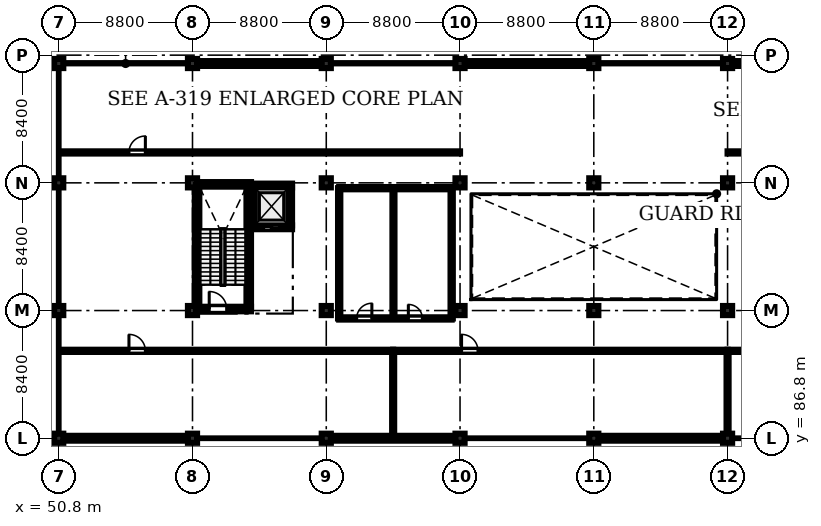
"""IFC4 building model, lengths in metres.
Left out: names, types, materials, properties, quantities, classifications, styles, units other than length and angle.
Written with IfcOpenShell. Run it as: python <this file> out.ifc"""

import sys

from ifc_helpers import new_model, si_unit, direction, frame, frame_2d, origin, origin_2d, place, context, subcontext, project, spatial, rectangle, extrude, element, fill, save


model = new_model("IFC4")
c1 = context("Model", 3, precision=1e-05, world=origin(), true_north=direction((0.0, 1.0)))
c2 = subcontext(c1, "Body", "Model", "MODEL_VIEW")
j1 = project(units=[si_unit("LENGTHUNIT", "METRE"), si_unit("PLANEANGLEUNIT", "RADIAN")], contexts=[c1])
p1 = place(None, origin())
s1 = spatial("IfcSite", under=j1, at=p1, CompositionType="ELEMENT")
p2 = place(p1, origin())
s2 = spatial("IfcBuilding", under=s1, at=p2, CompositionType="ELEMENT")
p3 = place(p2, frame((0.0, 0.0, 10.2)))
s3 = spatial("IfcBuildingStorey", under=s2, at=p3, CompositionType="ELEMENT", Elevation=10.2)
for number, where, z_axis, x_axis in (
    (1, (50.8, 86.8, 0.0), (0.0, 0.0, 1.0), (1.0, 0.0, 0.0)),
    (2, (50.8, 95.2, 0.0), (0.0, 0.0, 1.0), (1.0, 0.0, 0.0)),
    (3, (50.8, 103.6, 0.0), (0.0, 0.0, 1.0), (1.0, 0.0, 0.0)),
    (4, (50.8, 111.45, 0.0), (0.0, 0.0, 1.0), (1.0, 0.0, 0.0)),
    (5, (59.6, 86.8, 0.0), (0.0, 0.0, 1.0), (1.0, 0.0, 0.0)),
    (6, (59.6, 95.2, 0.0), (0.0, 0.0, 1.0), (1.0, 0.0, 0.0)),
    (7, (59.6, 103.6, 0.0), (0.0, 0.0, 1.0), (1.0, 0.0, 0.0)),
    (8, (59.6, 111.45, 0.0), (0.0, 0.0, 1.0), (1.0, 0.0, 0.0)),
    (9, (68.4, 86.8, 0.0), (0.0, 0.0, 1.0), (1.0, 0.0, 0.0)),
    (10, (68.4, 95.2, 0.0), (0.0, 0.0, 1.0), (1.0, 0.0, 0.0)),
    (11, (68.4, 103.6, 0.0), (0.0, 0.0, 1.0), (1.0, 0.0, 0.0)),
    (12, (68.4, 111.45, 0.0), (0.0, 0.0, 1.0), (1.0, 0.0, 0.0)),
    (13, (77.2, 86.8, 0.0), (0.0, 0.0, 1.0), (1.0, 0.0, 0.0)),
    (14, (77.2, 95.2, 0.0), (0.0, 0.0, 1.0), (1.0, 0.0, 0.0)),
    (15, (77.2, 103.6, 0.0), (0.0, 0.0, 1.0), (1.0, 0.0, 0.0)),
    (16, (77.2, 111.45, 0.0), (0.0, 0.0, 1.0), (1.0, 0.0, 0.0)),
    (17, (86.0, 86.8, 0.0), (0.0, 0.0, 1.0), (1.0, 0.0, 0.0)),
    (18, (86.0, 95.2, 0.0), (0.0, 0.0, 1.0), (1.0, 0.0, 0.0)),
    (19, (86.0, 103.6, 0.0), (0.0, 0.0, 1.0), (1.0, 0.0, 0.0)),
    (20, (86.0, 111.45, 0.0), (0.0, 0.0, 1.0), (1.0, 0.0, 0.0)),
    (21, (94.8, 86.8, 0.0), (0.0, 0.0, 1.0), (1.0, 0.0, 0.0)),
    (22, (94.8, 95.2, 0.0), (0.0, 0.0, 1.0), (1.0, 0.0, 0.0)),
    (23, (94.8, 103.6, 0.0), (0.0, 0.0, 1.0), (1.0, 0.0, 0.0)),
    (24, (94.8, 111.45, 0.0), (0.0, 0.0, 1.0), (1.0, 0.0, 0.0)),
):
    element("IfcColumn", number, at=place(p3, frame(where, z_axis=z_axis, x_axis=x_axis)), inside=s3, PredefinedType="COLUMN", context=c2, shape_type="SweptSolid", body=[
        extrude(rectangle(XDim=0.6, YDim=0.6, at=origin_2d()), origin(), (0.0, 0.0, 1.0), 4.26),
    ])
p4 = place(p3, frame((59.75, 95.3, 0.0), z_axis=(0.0, 0.0, 1.0), x_axis=(1.0, 0.0, 0.0)))
e25 = element("IfcWall", 25, at=p4, inside=s3, PredefinedType="SHEAR", context=c2, shape_type="SweptSolid", body=[
    extrude(rectangle(XDim=3.7, YDim=0.3, at=frame_2d((1.85, 0.0))), origin(), (0.0, 0.0, 1.0), 4.26),
])
p5 = place(p4, frame((0.95, 0.0, 0.0)))
e26 = element("IfcOpeningElement", 26, at=p5, cuts=e25, PredefinedType="OPENING", context=c2, shape_type="SweptSolid", body=[
    extrude(rectangle(XDim=1.15, YDim=2.15, at=frame_2d((0.575, 1.075))), frame((0.0, 0.16, 0.0), z_axis=(0.0, -1.0, 0.0), x_axis=(1.0, 0.0, 0.0)), (0.0, 0.0, 1.0), 0.32),
])
p6 = place(p3, frame((59.75, 103.5, 0.0), z_axis=(0.0, 0.0, 1.0), x_axis=(1.0, 0.0, 0.0)))
e27 = element("IfcWall", 27, at=p6, inside=s3, PredefinedType="SHEAR", context=c2, shape_type="SweptSolid", body=[
    extrude(rectangle(XDim=3.7, YDim=0.3, at=frame_2d((1.85, 0.0))), origin(), (0.0, 0.0, 1.0), 4.26),
])
for number, where, z_axis, x_axis in (
    (28, (59.9, 95.45, 0.0), (0.0, 0.0, 1.0), (0.0, 1.0, 0.0)),
    (29, (63.3, 95.45, 0.0), (0.0, 0.0, 1.0), (0.0, 1.0, 0.0)),
):
    element("IfcWall", number, at=place(p3, frame(where, z_axis=z_axis, x_axis=x_axis)), inside=s3, PredefinedType="SHEAR", context=c2, shape_type="SweptSolid", body=[
        extrude(rectangle(XDim=7.9, YDim=0.3, at=frame_2d((3.95, 0.0))), origin(), (0.0, 0.0, 1.0), 4.26),
    ])
p7 = place(p3, frame((63.45, 100.675, 0.0), z_axis=(0.0, 0.0, 1.0), x_axis=(1.0, 0.0, 0.0)))
e30 = element("IfcWall", 30, at=p7, inside=s3, PredefinedType="SHEAR", context=c2, shape_type="SweptSolid", body=[
    extrude(rectangle(XDim=2.7, YDim=0.25, at=frame_2d((1.35, 0.0))), origin(), (0.0, 0.0, 1.0), 4.26),
])
p8 = place(p7, frame((0.83, 0.0, 0.0)))
e31 = element("IfcOpeningElement", 31, at=p8, cuts=e30, PredefinedType="OPENING", context=c2, shape_type="SweptSolid", body=[
    extrude(rectangle(XDim=1.04, YDim=2.15, at=frame_2d((0.52, 1.075))), frame((0.0, 0.135, 0.0), z_axis=(0.0, -1.0, 0.0), x_axis=(1.0, 0.0, 0.0)), (0.0, 0.0, 1.0), 0.27),
])
p9 = place(p3, frame((63.45, 103.425, 0.0), z_axis=(0.0, 0.0, 1.0), x_axis=(1.0, 0.0, 0.0)))
e32 = element("IfcWall", 32, at=p9, inside=s3, PredefinedType="SHEAR", context=c2, shape_type="SweptSolid", body=[
    extrude(rectangle(XDim=2.7, YDim=0.25, at=frame_2d((1.35, 0.0))), origin(), (0.0, 0.0, 1.0), 4.26),
])
for number, where, z_axis, x_axis in (
    (33, (63.575, 100.8, 0.0), (0.0, 0.0, 1.0), (0.0, 1.0, 0.0)),
    (34, (66.025, 100.8, 0.0), (0.0, 0.0, 1.0), (0.0, 1.0, 0.0)),
):
    element("IfcWall", number, at=place(p3, frame(where, z_axis=z_axis, x_axis=x_axis)), inside=s3, PredefinedType="SHEAR", context=c2, shape_type="SweptSolid", body=[
        extrude(rectangle(XDim=2.5, YDim=0.25, at=frame_2d((1.25, 0.0))), origin(), (0.0, 0.0, 1.0), 4.26),
    ])
p10 = place(p3, frame((59.3, 86.8, 0.0), z_axis=(0.0, 0.0, 1.0), x_axis=(-1.0, 0.0, 0.0)))
e35 = element("IfcWall", 35, at=p10, inside=s3, PredefinedType="STANDARD", context=c2, shape_type="SweptSolid", body=[
    extrude(rectangle(XDim=8.2, YDim=0.32, at=frame_2d((4.1, 0.0))), origin(), (0.0, 0.0, 1.0), 3.61),
])
p11 = place(p10, frame((2.8, 0.0, 0.95)))
e36 = element("IfcOpeningElement", 36, at=p11, cuts=e35, PredefinedType="OPENING", context=c2, shape_type="SweptSolid", body=[
    extrude(rectangle(XDim=1.95, YDim=2.15, at=frame_2d((0.975, 1.075))), frame((0.0, 0.17, 0.0), z_axis=(0.0, -1.0, 0.0), x_axis=(1.0, 0.0, 0.0)), (0.0, 0.0, 1.0), 0.34),
])
p12 = place(p3, frame((59.9, 111.45, 0.0), z_axis=(0.0, 0.0, 1.0), x_axis=(1.0, 0.0, 0.0)))
e37 = element("IfcWall", 37, at=p12, inside=s3, PredefinedType="STANDARD", context=c2, shape_type="SweptSolid", body=[
    extrude(rectangle(XDim=8.2, YDim=0.32, at=frame_2d((4.1, 0.0))), origin(), (0.0, 0.0, 1.0), 3.51),
])
p13 = place(p12, frame((1.1, 0.0, 0.9)))
e38 = element("IfcOpeningElement", 38, at=p13, cuts=e37, PredefinedType="OPENING", context=c2, shape_type="SweptSolid", body=[
    extrude(rectangle(XDim=2.4, YDim=2.2, at=frame_2d((1.2, 1.1))), frame((0.0, 0.17, 0.0), z_axis=(0.0, -1.0, 0.0), x_axis=(1.0, 0.0, 0.0)), (0.0, 0.0, 1.0), 0.34),
])
p14 = place(p12, frame((4.7, 0.0, 0.9)))
e39 = element("IfcOpeningElement", 39, at=p14, cuts=e37, PredefinedType="OPENING", context=c2, shape_type="SweptSolid", body=[
    extrude(rectangle(XDim=2.4, YDim=2.2, at=frame_2d((1.2, 1.1))), frame((0.0, 0.17, 0.0), z_axis=(0.0, -1.0, 0.0), x_axis=(1.0, 0.0, 0.0)), (0.0, 0.0, 1.0), 0.34),
])
p15 = place(p3, frame((76.9, 86.8, 0.0), z_axis=(0.0, 0.0, 1.0), x_axis=(-1.0, 0.0, 0.0)))
e40 = element("IfcWall", 40, at=p15, inside=s3, PredefinedType="STANDARD", context=c2, shape_type="SweptSolid", body=[
    extrude(rectangle(XDim=8.2, YDim=0.32, at=frame_2d((4.1, 0.0))), origin(), (0.0, 0.0, 1.0), 3.61),
])
p16 = place(p15, frame((1.2, 0.0, 0.95)))
e41 = element("IfcOpeningElement", 41, at=p16, cuts=e40, PredefinedType="OPENING", context=c2, shape_type="SweptSolid", body=[
    extrude(rectangle(XDim=1.95, YDim=2.15, at=frame_2d((0.975, 1.075))), frame((0.0, 0.17, 0.0), z_axis=(0.0, -1.0, 0.0), x_axis=(1.0, 0.0, 0.0)), (0.0, 0.0, 1.0), 0.34),
])
p17 = place(p3, frame((77.5, 111.45, 0.0), z_axis=(0.0, 0.0, 1.0), x_axis=(1.0, 0.0, 0.0)))
e42 = element("IfcWall", 42, at=p17, inside=s3, PredefinedType="STANDARD", context=c2, shape_type="SweptSolid", body=[
    extrude(rectangle(XDim=8.2, YDim=0.32, at=frame_2d((4.1, 0.0))), origin(), (0.0, 0.0, 1.0), 3.51),
])
p18 = place(p17, frame((1.1, 0.0, 0.9)))
e43 = element("IfcOpeningElement", 43, at=p18, cuts=e42, PredefinedType="OPENING", context=c2, shape_type="SweptSolid", body=[
    extrude(rectangle(XDim=2.4, YDim=2.2, at=frame_2d((1.2, 1.1))), frame((0.0, 0.17, 0.0), z_axis=(0.0, -1.0, 0.0), x_axis=(1.0, 0.0, 0.0)), (0.0, 0.0, 1.0), 0.34),
])
p19 = place(p17, frame((4.7, 0.0, 0.9)))
e44 = element("IfcOpeningElement", 44, at=p19, cuts=e42, PredefinedType="OPENING", context=c2, shape_type="SweptSolid", body=[
    extrude(rectangle(XDim=2.4, YDim=2.2, at=frame_2d((1.2, 1.1))), frame((0.0, 0.17, 0.0), z_axis=(0.0, -1.0, 0.0), x_axis=(1.0, 0.0, 0.0)), (0.0, 0.0, 1.0), 0.34),
])
p20 = place(p3, frame((94.5, 86.8, 0.0), z_axis=(0.0, 0.0, 1.0), x_axis=(-1.0, 0.0, 0.0)))
e45 = element("IfcWall", 45, at=p20, inside=s3, PredefinedType="STANDARD", context=c2, shape_type="SweptSolid", body=[
    extrude(rectangle(XDim=8.2, YDim=0.32, at=frame_2d((4.1, 0.0))), origin(), (0.0, 0.0, 1.0), 3.61),
])
p21 = place(p20, frame((2.8, 0.0, 0.95)))
e46 = element("IfcOpeningElement", 46, at=p21, cuts=e45, PredefinedType="OPENING", context=c2, shape_type="SweptSolid", body=[
    extrude(rectangle(XDim=1.95, YDim=2.15, at=frame_2d((0.975, 1.075))), frame((0.0, 0.17, 0.0), z_axis=(0.0, -1.0, 0.0), x_axis=(1.0, 0.0, 0.0)), (0.0, 0.0, 1.0), 0.34),
])
p22 = place(p3, frame((95.1, 111.45, 0.0), z_axis=(0.0, 0.0, 1.0), x_axis=(1.0, 0.0, 0.0)))
e47 = element("IfcWall", 47, at=p22, inside=s3, PredefinedType="STANDARD", context=c2, shape_type="SweptSolid", body=[
    extrude(rectangle(XDim=8.2, YDim=0.32, at=frame_2d((4.1, 0.0))), origin(), (0.0, 0.0, 1.0), 3.51),
])
p23 = place(p22, frame((1.1, 0.0, 0.9)))
e48 = element("IfcOpeningElement", 48, at=p23, cuts=e47, PredefinedType="OPENING", context=c2, shape_type="SweptSolid", body=[
    extrude(rectangle(XDim=2.4, YDim=2.2, at=frame_2d((1.2, 1.1))), frame((0.0, 0.17, 0.0), z_axis=(0.0, -1.0, 0.0), x_axis=(1.0, 0.0, 0.0)), (0.0, 0.0, 1.0), 0.34),
])
p24 = place(p22, frame((4.7, 0.0, 0.9)))
e49 = element("IfcOpeningElement", 49, at=p24, cuts=e47, PredefinedType="OPENING", context=c2, shape_type="SweptSolid", body=[
    extrude(rectangle(XDim=2.4, YDim=2.2, at=frame_2d((1.2, 1.1))), frame((0.0, 0.17, 0.0), z_axis=(0.0, -1.0, 0.0), x_axis=(1.0, 0.0, 0.0)), (0.0, 0.0, 1.0), 0.34),
])
p25 = place(p3, frame((69.25, 94.68, 0.0), z_axis=(0.0, 0.0, 1.0), x_axis=(1.0, 0.0, 0.0)))
e50 = element("IfcWall", 50, at=p25, inside=s3, PredefinedType="PARTITIONING", context=c2, shape_type="SweptSolid", body=[
    extrude(rectangle(XDim=7.4, YDim=0.15, at=frame_2d((3.7, 0.0))), origin(), (0.0, 0.0, 1.0), 4.26),
])
p26 = place(p25, frame((1.15, 0.0, 0.0)))
e51 = element("IfcOpeningElement", 51, at=p26, cuts=e50, PredefinedType="OPENING", context=c2, shape_type="SweptSolid", body=[
    extrude(rectangle(XDim=1.0, YDim=2.12, at=frame_2d((0.5, 1.06))), frame((0.0, 0.085, 0.0), z_axis=(0.0, -1.0, 0.0), x_axis=(1.0, 0.0, 0.0)), (0.0, 0.0, 1.0), 0.17),
])
p27 = place(p25, frame((4.55, 0.0, 0.0)))
e52 = element("IfcOpeningElement", 52, at=p27, cuts=e50, PredefinedType="OPENING", context=c2, shape_type="SweptSolid", body=[
    extrude(rectangle(XDim=0.92, YDim=2.1, at=frame_2d((0.46, 1.05))), frame((0.0, 0.085, 0.0), z_axis=(0.0, -1.0, 0.0), x_axis=(1.0, 0.0, 0.0)), (0.0, 0.0, 1.0), 0.17),
])
p28 = place(p3, frame((69.25, 94.68, 0.0), z_axis=(0.0, 0.0, 1.0), x_axis=(0.0, 1.0, 0.0)))
e53 = element("IfcWall", 53, at=p28, inside=s3, PredefinedType="PARTITIONING", context=c2, shape_type="SweptSolid", body=[
    extrude(rectangle(XDim=8.57, YDim=0.15, at=frame_2d((4.285, 0.0))), origin(), (0.0, 0.0, 1.0), 4.26),
])
p29 = place(p3, frame((72.82, 94.68, 0.0), z_axis=(0.0, 0.0, 1.0), x_axis=(0.0, 1.0, 0.0)))
e54 = element("IfcWall", 54, at=p29, inside=s3, PredefinedType="PARTITIONING", context=c2, shape_type="SweptSolid", body=[
    extrude(rectangle(XDim=8.57, YDim=0.135, at=frame_2d((4.285, 0.0))), origin(), (0.0, 0.0, 1.0), 3.76),
])
p30 = place(p3, frame((69.25, 103.25, 0.0), z_axis=(0.0, 0.0, 1.0), x_axis=(1.0, 0.0, 0.0)))
e55 = element("IfcWall", 55, at=p30, inside=s3, PredefinedType="PARTITIONING", context=c2, shape_type="SweptSolid", body=[
    extrude(rectangle(XDim=7.4, YDim=0.15, at=frame_2d((3.7, 0.0))), origin(), (0.0, 0.0, 1.0), 4.26),
])
p31 = place(p3, frame((76.65, 94.68, 0.0), z_axis=(0.0, 0.0, 1.0), x_axis=(0.0, 1.0, 0.0)))
e56 = element("IfcWall", 56, at=p31, inside=s3, PredefinedType="PARTITIONING", context=c2, shape_type="SweptSolid", body=[
    extrude(rectangle(XDim=8.57, YDim=0.15, at=frame_2d((4.285, 0.0))), origin(), (0.0, 0.0, 1.0), 4.26),
])
p32 = place(p3, frame((50.92, 92.55, 0.0), z_axis=(0.0, 0.0, 1.0), x_axis=(1.0, 0.0, 0.0)))
e57 = element("IfcWall", 57, at=p32, inside=s3, PredefinedType="PARTITIONING", context=c2, shape_type="SweptSolid", body=[
    extrude(rectangle(XDim=21.88, YDim=0.145, at=frame_2d((10.94, 0.0))), origin(), (0.0, 0.0, 1.0), 4.26),
])
p33 = place(p32, frame((4.5, 0.0, 0.0)))
e58 = element("IfcOpeningElement", 58, at=p33, cuts=e57, PredefinedType="OPENING", context=c2, shape_type="SweptSolid", body=[
    extrude(rectangle(XDim=1.08, YDim=2.15, at=frame_2d((0.54, 1.075))), frame((0.0, 0.083, 0.0), z_axis=(0.0, -1.0, 0.0), x_axis=(1.0, 0.0, 0.0)), (0.0, 0.0, 1.0), 0.165),
])
p34 = place(p3, frame((72.8, 92.55, 0.0), z_axis=(0.0, 0.0, 1.0), x_axis=(1.0, 0.0, 0.0)))
e59 = element("IfcWall", 59, at=p34, inside=s3, PredefinedType="PARTITIONING", context=c2, shape_type="SweptSolid", body=[
    extrude(rectangle(XDim=22.0, YDim=0.145, at=frame_2d((11.0, 0.0))), origin(), (0.0, 0.0, 1.0), 4.26),
])
p35 = place(p34, frame((4.5, 0.0, 0.0)))
e60 = element("IfcOpeningElement", 60, at=p35, cuts=e59, PredefinedType="OPENING", context=c2, shape_type="SweptSolid", body=[
    extrude(rectangle(XDim=1.08, YDim=2.15, at=frame_2d((0.54, 1.075))), frame((0.0, 0.083, 0.0), z_axis=(0.0, -1.0, 0.0), x_axis=(1.0, 0.0, 0.0)), (0.0, 0.0, 1.0), 0.165),
])
p36 = place(p3, frame((72.8, 86.95, 0.0), z_axis=(0.0, 0.0, 1.0), x_axis=(0.0, 1.0, 0.0)))
e61 = element("IfcWall", 61, at=p36, inside=s3, PredefinedType="PARTITIONING", context=c2, shape_type="SweptSolid", body=[
    extrude(rectangle(XDim=5.6, YDim=0.135, at=frame_2d((2.8, 0.0))), origin(), (0.0, 0.0, 1.0), 3.76),
])
p37 = place(p3, frame((94.8, 92.55, 0.0), z_axis=(0.0, 0.0, 1.0), x_axis=(1.0, 0.0, 0.0)))
e62 = element("IfcWall", 62, at=p37, inside=s3, PredefinedType="PARTITIONING", context=c2, shape_type="SweptSolid", body=[
    extrude(rectangle(XDim=26.22, YDim=0.145, at=frame_2d((13.11, 0.0))), origin(), (0.0, 0.0, 1.0), 4.26),
])
p38 = place(p37, frame((4.5, 0.0, 0.0)))
e63 = element("IfcOpeningElement", 63, at=p38, cuts=e62, PredefinedType="OPENING", context=c2, shape_type="SweptSolid", body=[
    extrude(rectangle(XDim=1.7, YDim=2.2, at=frame_2d((0.85, 1.1))), frame((0.0, 0.083, 0.0), z_axis=(0.0, -1.0, 0.0), x_axis=(1.0, 0.0, 0.0)), (0.0, 0.0, 1.0), 0.165),
])
p39 = place(p3, frame((94.8, 86.95, 0.0), z_axis=(0.0, 0.0, 1.0), x_axis=(0.0, 1.0, 0.0)))
e64 = element("IfcWall", 64, at=p39, inside=s3, PredefinedType="PARTITIONING", context=c2, shape_type="SweptSolid", body=[
    extrude(rectangle(XDim=5.6, YDim=0.135, at=frame_2d((2.8, 0.0))), origin(), (0.0, 0.0, 1.0), 3.61),
])
p40 = place(p3, frame((50.92, 105.6, 0.0), z_axis=(0.0, 0.0, 1.0), x_axis=(1.0, 0.0, 0.0)))
e65 = element("IfcWall", 65, at=p40, inside=s3, PredefinedType="PARTITIONING", context=c2, shape_type="SweptSolid", body=[
    extrude(rectangle(XDim=26.28, YDim=0.145, at=frame_2d((13.14, 0.0))), origin(), (0.0, 0.0, 1.0), 4.26),
])
p41 = place(p40, frame((4.5, 0.0, 0.0)))
e66 = element("IfcOpeningElement", 66, at=p41, cuts=e65, PredefinedType="OPENING", context=c2, shape_type="SweptSolid", body=[
    extrude(rectangle(XDim=1.08, YDim=2.15, at=frame_2d((0.54, 1.075))), frame((0.0, 0.083, 0.0), z_axis=(0.0, -1.0, 0.0), x_axis=(1.0, 0.0, 0.0)), (0.0, 0.0, 1.0), 0.165),
])
p42 = place(p3, frame((94.8, 105.6, 0.0), z_axis=(0.0, 0.0, 1.0), x_axis=(1.0, 0.0, 0.0)))
e67 = element("IfcWall", 67, at=p42, inside=s3, PredefinedType="PARTITIONING", context=c2, shape_type="SweptSolid", body=[
    extrude(rectangle(XDim=26.22, YDim=0.145, at=frame_2d((13.11, 0.0))), origin(), (0.0, 0.0, 1.0), 4.26),
])
p43 = place(p42, frame((4.5, 0.0, 0.0)))
e68 = element("IfcOpeningElement", 68, at=p43, cuts=e67, PredefinedType="OPENING", context=c2, shape_type="SweptSolid", body=[
    extrude(rectangle(XDim=1.02, YDim=2.15, at=frame_2d((0.51, 1.075))), frame((0.0, 0.083, 0.0), z_axis=(0.0, -1.0, 0.0), x_axis=(1.0, 0.0, 0.0)), (0.0, 0.0, 1.0), 0.165),
])
p44 = place(p11, origin())
e69 = element("IfcWindow", 69, at=p44, inside=s3, PartitioningType="DOUBLE_PANEL_VERTICAL", PredefinedType="WINDOW", context=c2, shape_type="SweptSolid", body=[
    extrude(rectangle(XDim=1.95, YDim=2.15, at=frame_2d((0.975, 1.075))), frame((0.0, 0.03, 0.0), z_axis=(0.0, -1.0, 0.0), x_axis=(1.0, 0.0, 0.0)), (0.0, 0.0, 1.0), 0.06),
])
fill(e36, e69)
p45 = place(p13, origin())
e70 = element("IfcWindow", 70, at=p45, inside=s3, PartitioningType="TRIPLE_PANEL_VERTICAL", PredefinedType="WINDOW", context=c2, shape_type="SweptSolid", body=[
    extrude(rectangle(XDim=2.4, YDim=2.2, at=frame_2d((1.2, 1.1))), frame((0.0, 0.03, 0.0), z_axis=(0.0, -1.0, 0.0), x_axis=(1.0, 0.0, 0.0)), (0.0, 0.0, 1.0), 0.06),
])
fill(e38, e70)
p46 = place(p14, origin())
e71 = element("IfcWindow", 71, at=p46, inside=s3, PartitioningType="TRIPLE_PANEL_VERTICAL", PredefinedType="WINDOW", context=c2, shape_type="SweptSolid", body=[
    extrude(rectangle(XDim=2.4, YDim=2.2, at=frame_2d((1.2, 1.1))), frame((0.0, 0.03, 0.0), z_axis=(0.0, -1.0, 0.0), x_axis=(1.0, 0.0, 0.0)), (0.0, 0.0, 1.0), 0.06),
])
fill(e39, e71)
p47 = place(p16, origin())
e72 = element("IfcWindow", 72, at=p47, inside=s3, PartitioningType="DOUBLE_PANEL_VERTICAL", PredefinedType="WINDOW", context=c2, shape_type="SweptSolid", body=[
    extrude(rectangle(XDim=1.95, YDim=2.15, at=frame_2d((0.975, 1.075))), frame((0.0, 0.03, 0.0), z_axis=(0.0, -1.0, 0.0), x_axis=(1.0, 0.0, 0.0)), (0.0, 0.0, 1.0), 0.06),
])
fill(e41, e72)
p48 = place(p18, origin())
e73 = element("IfcWindow", 73, at=p48, inside=s3, PartitioningType="TRIPLE_PANEL_VERTICAL", PredefinedType="WINDOW", context=c2, shape_type="SweptSolid", body=[
    extrude(rectangle(XDim=2.4, YDim=2.2, at=frame_2d((1.2, 1.1))), frame((0.0, 0.03, 0.0), z_axis=(0.0, -1.0, 0.0), x_axis=(1.0, 0.0, 0.0)), (0.0, 0.0, 1.0), 0.06),
])
fill(e43, e73)
p49 = place(p19, origin())
e74 = element("IfcWindow", 74, at=p49, inside=s3, PartitioningType="TRIPLE_PANEL_VERTICAL", PredefinedType="WINDOW", context=c2, shape_type="SweptSolid", body=[
    extrude(rectangle(XDim=2.4, YDim=2.2, at=frame_2d((1.2, 1.1))), frame((0.0, 0.03, 0.0), z_axis=(0.0, -1.0, 0.0), x_axis=(1.0, 0.0, 0.0)), (0.0, 0.0, 1.0), 0.06),
])
fill(e44, e74)
p50 = place(p21, origin())
e75 = element("IfcWindow", 75, at=p50, inside=s3, PartitioningType="DOUBLE_PANEL_VERTICAL", PredefinedType="WINDOW", context=c2, shape_type="SweptSolid", body=[
    extrude(rectangle(XDim=1.95, YDim=2.15, at=frame_2d((0.975, 1.075))), frame((0.0, 0.03, 0.0), z_axis=(0.0, -1.0, 0.0), x_axis=(1.0, 0.0, 0.0)), (0.0, 0.0, 1.0), 0.06),
])
fill(e46, e75)
p51 = place(p26, origin())
e76 = element("IfcDoor", 76, at=p51, inside=s3, OperationType="SINGLE_SWING_RIGHT", PredefinedType="DOOR", context=c2, shape_type="SweptSolid", body=[
    extrude(rectangle(XDim=1.0, YDim=2.12, at=frame_2d((0.5, 1.06))), frame((0.0, 0.025, 0.0), z_axis=(0.0, -1.0, 0.0), x_axis=(1.0, 0.0, 0.0)), (0.0, 0.0, 1.0), 0.05),
])
fill(e51, e76)
p52 = place(p27, origin())
e77 = element("IfcDoor", 77, at=p52, inside=s3, OperationType="SINGLE_SWING_LEFT", PredefinedType="DOOR", context=c2, shape_type="SweptSolid", body=[
    extrude(rectangle(XDim=0.92, YDim=2.1, at=frame_2d((0.46, 1.05))), frame((0.0, 0.025, 0.0), z_axis=(0.0, -1.0, 0.0), x_axis=(1.0, 0.0, 0.0)), (0.0, 0.0, 1.0), 0.05),
])
fill(e52, e77)
p53 = place(p33, origin())
e78 = element("IfcDoor", 78, at=p53, inside=s3, OperationType="SINGLE_SWING_LEFT", PredefinedType="DOOR", context=c2, shape_type="SweptSolid", body=[
    extrude(rectangle(XDim=1.08, YDim=2.15, at=frame_2d((0.54, 1.075))), frame((0.0, 0.025, 0.0), z_axis=(0.0, -1.0, 0.0), x_axis=(1.0, 0.0, 0.0)), (0.0, 0.0, 1.0), 0.05),
])
fill(e58, e78)
p54 = place(p35, origin())
e79 = element("IfcDoor", 79, at=p54, inside=s3, OperationType="SINGLE_SWING_LEFT", PredefinedType="DOOR", context=c2, shape_type="SweptSolid", body=[
    extrude(rectangle(XDim=1.08, YDim=2.15, at=frame_2d((0.54, 1.075))), frame((0.0, 0.025, 0.0), z_axis=(0.0, -1.0, 0.0), x_axis=(1.0, 0.0, 0.0)), (0.0, 0.0, 1.0), 0.05),
])
fill(e60, e79)
p55 = place(p41, origin())
e80 = element("IfcDoor", 80, at=p55, inside=s3, OperationType="SINGLE_SWING_RIGHT", PredefinedType="DOOR", context=c2, shape_type="SweptSolid", body=[
    extrude(rectangle(XDim=1.08, YDim=2.15, at=frame_2d((0.54, 1.075))), frame((0.0, 0.025, 0.0), z_axis=(0.0, -1.0, 0.0), x_axis=(1.0, 0.0, 0.0)), (0.0, 0.0, 1.0), 0.05),
])
fill(e66, e80)
p56 = place(p5, origin())
e81 = element("IfcDoor", 81, at=p56, inside=s3, OperationType="SINGLE_SWING_LEFT", PredefinedType="DOOR", context=c2, shape_type="SweptSolid", body=[
    extrude(rectangle(XDim=1.15, YDim=2.15, at=frame_2d((0.575, 1.075))), frame((0.0, 0.025, 0.0), z_axis=(0.0, -1.0, 0.0), x_axis=(1.0, 0.0, 0.0)), (0.0, 0.0, 1.0), 0.05),
])
fill(e26, e81)
p57 = place(p8, origin())
e82 = element("IfcDoor", 82, at=p57, inside=s3, OperationType="SLIDING_TO_LEFT", PredefinedType="DOOR", context=c2, shape_type="SweptSolid", body=[
    extrude(rectangle(XDim=1.04, YDim=2.15, at=frame_2d((0.52, 1.075))), frame((0.0, 0.025, 0.0), z_axis=(0.0, -1.0, 0.0), x_axis=(1.0, 0.0, 0.0)), (0.0, 0.0, 1.0), 0.05),
])
fill(e31, e82)
save(model, sys.argv[1])
